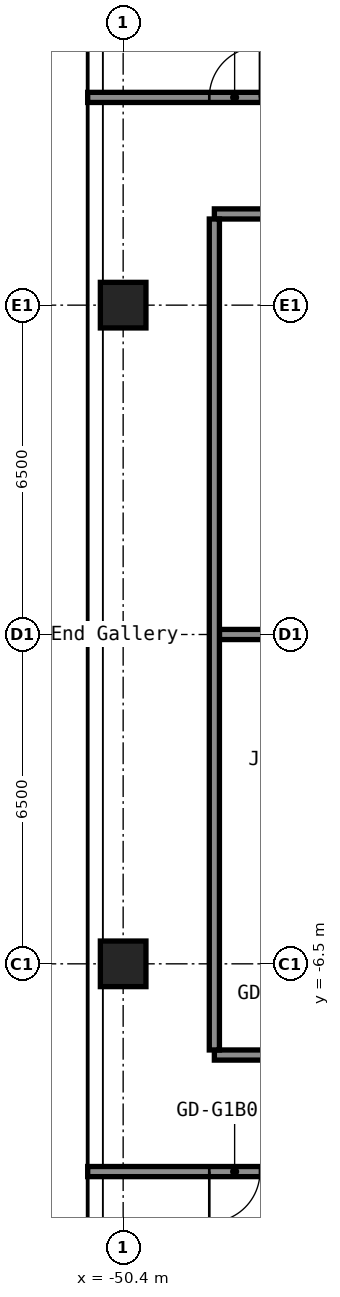
"""IFC4 building model, lengths in metres.
Left out: names, types, materials, properties, quantities, classifications, styles, units other than length and angle.
Written with IfcOpenShell. Run it as: python <this file> out.ifc"""

import sys

from ifc_helpers import new_model, si_unit, direction, frame, frame_2d, origin, origin_2d, place, context, subcontext, project, spatial, rectangle, hollow_rectangle, extrude, element, fill, save


model = new_model("IFC4")
c1 = context("Model", 3, precision=1e-05, world=origin(), true_north=direction((0.0, 1.0)))
c2 = subcontext(c1, "Body", "Model", "MODEL_VIEW")
j1 = project(units=[si_unit("LENGTHUNIT", "METRE"), si_unit("PLANEANGLEUNIT", "RADIAN")], contexts=[c1])
p1 = place(None, origin())
s1 = spatial("IfcSite", under=j1, at=p1, CompositionType="ELEMENT")
p2 = place(p1, origin())
s2 = spatial("IfcBuilding", under=s1, at=p2, CompositionType="ELEMENT")
p3 = place(p2, frame((0.0, 0.0, 23.0)))
s3 = spatial("IfcBuildingStorey", under=s2, at=p3, CompositionType="ELEMENT", Elevation=23.0)
for number, where, z_axis, x_axis in (
    (1, (-50.4, -6.5, 0.0), (0.0, 0.0, 1.0), (1.0, 0.0, 0.0)),
    (2, (-50.4, 6.5, 0.0), (0.0, 0.0, 1.0), (1.0, 0.0, 0.0)),
):
    element("IfcColumn", number, at=place(p3, frame(where, z_axis=z_axis, x_axis=x_axis)), inside=s3, PredefinedType="COLUMN", context=c2, shape_type="SweptSolid", body=[
        extrude(hollow_rectangle(XDim=0.9, YDim=0.9, WallThickness=0.036, at=origin_2d()), origin(), (0.0, 0.0, 1.0), 2.8),
    ])
p4 = place(p3, frame((-51.1, -10.6, 0.0), z_axis=(0.0, 0.0, 1.0), x_axis=(1.0, 0.0, 0.0)))
e3 = element("IfcWall", 3, at=p4, inside=s3, PredefinedType="PARTITIONING", context=c2, shape_type="SweptSolid", body=[
    extrude(rectangle(XDim=34.3, YDim=0.2, at=frame_2d((17.15, 0.0))), origin(), (0.0, 0.0, 1.0), 2.8),
])
p5 = place(p4, frame((2.4, 0.0, 0.0)))
e4 = element("IfcOpeningElement", 4, at=p5, cuts=e3, PredefinedType="OPENING", context=c2, shape_type="SweptSolid", body=[
    extrude(rectangle(XDim=1.0, YDim=2.1, at=frame_2d((0.5, 1.05))), frame((0.0, 0.11, 0.0), z_axis=(0.0, -1.0, 0.0), x_axis=(1.0, 0.0, 0.0)), (0.0, 0.0, 1.0), 0.22),
])
p6 = place(p4, frame((11.95, 0.0, 0.0)))
e5 = element("IfcOpeningElement", 5, at=p6, cuts=e3, PredefinedType="OPENING", context=c2, shape_type="SweptSolid", body=[
    extrude(rectangle(XDim=1.0, YDim=2.1, at=frame_2d((0.5, 1.05))), frame((0.0, 0.11, 0.0), z_axis=(0.0, -1.0, 0.0), x_axis=(1.0, 0.0, 0.0)), (0.0, 0.0, 1.0), 0.22),
])
p7 = place(p4, frame((13.65, 0.0, 0.0)))
e6 = element("IfcOpeningElement", 6, at=p7, cuts=e3, PredefinedType="OPENING", context=c2, shape_type="SweptSolid", body=[
    extrude(rectangle(XDim=1.0, YDim=2.1, at=frame_2d((0.5, 1.05))), frame((0.0, 0.11, 0.0), z_axis=(0.0, -1.0, 0.0), x_axis=(1.0, 0.0, 0.0)), (0.0, 0.0, 1.0), 0.22),
])
p8 = place(p4, frame((20.35, 0.0, 0.0)))
e7 = element("IfcOpeningElement", 7, at=p8, cuts=e3, PredefinedType="OPENING", context=c2, shape_type="SweptSolid", body=[
    extrude(rectangle(XDim=1.0, YDim=2.1, at=frame_2d((0.5, 1.05))), frame((0.0, 0.11, 0.0), z_axis=(0.0, -1.0, 0.0), x_axis=(1.0, 0.0, 0.0)), (0.0, 0.0, 1.0), 0.22),
])
p9 = place(p4, frame((22.05, 0.0, 0.0)))
e8 = element("IfcOpeningElement", 8, at=p9, cuts=e3, PredefinedType="OPENING", context=c2, shape_type="SweptSolid", body=[
    extrude(rectangle(XDim=1.0, YDim=2.1, at=frame_2d((0.5, 1.05))), frame((0.0, 0.11, 0.0), z_axis=(0.0, -1.0, 0.0), x_axis=(1.0, 0.0, 0.0)), (0.0, 0.0, 1.0), 0.22),
])
p10 = place(p4, frame((28.75, 0.0, 0.0)))
e9 = element("IfcOpeningElement", 9, at=p10, cuts=e3, PredefinedType="OPENING", context=c2, shape_type="SweptSolid", body=[
    extrude(rectangle(XDim=1.0, YDim=2.1, at=frame_2d((0.5, 1.05))), frame((0.0, 0.11, 0.0), z_axis=(0.0, -1.0, 0.0), x_axis=(1.0, 0.0, 0.0)), (0.0, 0.0, 1.0), 0.22),
])
p11 = place(p4, frame((30.45, 0.0, 0.0)))
e10 = element("IfcOpeningElement", 10, at=p11, cuts=e3, PredefinedType="OPENING", context=c2, shape_type="SweptSolid", body=[
    extrude(rectangle(XDim=1.0, YDim=2.1, at=frame_2d((0.5, 1.05))), frame((0.0, 0.11, 0.0), z_axis=(0.0, -1.0, 0.0), x_axis=(1.0, 0.0, 0.0)), (0.0, 0.0, 1.0), 0.22),
])
p12 = place(p3, frame((-48.6, -8.3, 0.0), z_axis=(0.0, 0.0, 1.0), x_axis=(1.0, 0.0, 0.0)))
e11 = element("IfcWall", 11, at=p12, inside=s3, PredefinedType="PARTITIONING", context=c2, shape_type="SweptSolid", body=[
    extrude(rectangle(XDim=15.0, YDim=0.2, at=frame_2d((7.5, 0.0))), origin(), (0.0, 0.0, 1.0), 2.8),
])
p13 = place(p12, frame((1.1, 0.0, 0.0)))
e12 = element("IfcOpeningElement", 12, at=p13, cuts=e11, PredefinedType="OPENING", context=c2, shape_type="SweptSolid", body=[
    extrude(rectangle(XDim=1.0, YDim=2.1, at=frame_2d((0.5, 1.05))), frame((0.0, 0.11, 0.0), z_axis=(0.0, -1.0, 0.0), x_axis=(1.0, 0.0, 0.0)), (0.0, 0.0, 1.0), 0.22),
])
p14 = place(p12, frame((12.0, 0.0, 0.0)))
e13 = element("IfcOpeningElement", 13, at=p14, cuts=e11, PredefinedType="OPENING", context=c2, shape_type="SweptSolid", body=[
    extrude(rectangle(XDim=1.0, YDim=2.1, at=frame_2d((0.5, 1.05))), frame((0.0, 0.11, 0.0), z_axis=(0.0, -1.0, 0.0), x_axis=(1.0, 0.0, 0.0)), (0.0, 0.0, 1.0), 0.22),
])
p15 = place(p3, frame((-48.5, 0.0, 0.0), z_axis=(0.0, 0.0, 1.0), x_axis=(1.0, 0.0, 0.0)))
e14 = element("IfcWall", 14, at=p15, inside=s3, PredefinedType="PARTITIONING", context=c2, shape_type="SweptSolid", body=[
    extrude(rectangle(XDim=14.9, YDim=0.2, at=frame_2d((7.45, 0.0))), origin(), (0.0, 0.0, 1.0), 2.8),
])
p16 = place(p3, frame((-48.6, 8.3, 0.0), z_axis=(0.0, 0.0, 1.0), x_axis=(1.0, 0.0, 0.0)))
e15 = element("IfcWall", 15, at=p16, inside=s3, PredefinedType="PARTITIONING", context=c2, shape_type="SweptSolid", body=[
    extrude(rectangle(XDim=15.0, YDim=0.2, at=frame_2d((7.5, 0.0))), origin(), (0.0, 0.0, 1.0), 2.8),
])
p17 = place(p16, frame((3.85, 0.0, 0.0)))
e16 = element("IfcOpeningElement", 16, at=p17, cuts=e15, PredefinedType="OPENING", context=c2, shape_type="SweptSolid", body=[
    extrude(rectangle(XDim=1.6, YDim=2.1, at=frame_2d((0.8, 1.05))), frame((0.0, 0.11, 0.0), z_axis=(0.0, -1.0, 0.0), x_axis=(1.0, 0.0, 0.0)), (0.0, 0.0, 1.0), 0.22),
])
p18 = place(p3, frame((-51.1, 10.6, 0.0), z_axis=(0.0, 0.0, 1.0), x_axis=(1.0, 0.0, 0.0)))
e17 = element("IfcWall", 17, at=p18, inside=s3, PredefinedType="PARTITIONING", context=c2, shape_type="SweptSolid", body=[
    extrude(rectangle(XDim=34.3, YDim=0.2, at=frame_2d((17.15, 0.0))), origin(), (0.0, 0.0, 1.0), 2.8),
])
p19 = place(p18, frame((2.4, 0.0, 0.0)))
e18 = element("IfcOpeningElement", 18, at=p19, cuts=e17, PredefinedType="OPENING", context=c2, shape_type="SweptSolid", body=[
    extrude(rectangle(XDim=1.0, YDim=2.1, at=frame_2d((0.5, 1.05))), frame((0.0, 0.11, 0.0), z_axis=(0.0, -1.0, 0.0), x_axis=(1.0, 0.0, 0.0)), (0.0, 0.0, 1.0), 0.22),
])
p20 = place(p18, frame((11.95, 0.0, 0.0)))
e19 = element("IfcOpeningElement", 19, at=p20, cuts=e17, PredefinedType="OPENING", context=c2, shape_type="SweptSolid", body=[
    extrude(rectangle(XDim=1.0, YDim=2.1, at=frame_2d((0.5, 1.05))), frame((0.0, 0.11, 0.0), z_axis=(0.0, -1.0, 0.0), x_axis=(1.0, 0.0, 0.0)), (0.0, 0.0, 1.0), 0.22),
])
p21 = place(p18, frame((13.65, 0.0, 0.0)))
e20 = element("IfcOpeningElement", 20, at=p21, cuts=e17, PredefinedType="OPENING", context=c2, shape_type="SweptSolid", body=[
    extrude(rectangle(XDim=1.0, YDim=2.1, at=frame_2d((0.5, 1.05))), frame((0.0, 0.11, 0.0), z_axis=(0.0, -1.0, 0.0), x_axis=(1.0, 0.0, 0.0)), (0.0, 0.0, 1.0), 0.22),
])
p22 = place(p18, frame((20.35, 0.0, 0.0)))
e21 = element("IfcOpeningElement", 21, at=p22, cuts=e17, PredefinedType="OPENING", context=c2, shape_type="SweptSolid", body=[
    extrude(rectangle(XDim=1.0, YDim=2.1, at=frame_2d((0.5, 1.05))), frame((0.0, 0.11, 0.0), z_axis=(0.0, -1.0, 0.0), x_axis=(1.0, 0.0, 0.0)), (0.0, 0.0, 1.0), 0.22),
])
p23 = place(p18, frame((22.05, 0.0, 0.0)))
e22 = element("IfcOpeningElement", 22, at=p23, cuts=e17, PredefinedType="OPENING", context=c2, shape_type="SweptSolid", body=[
    extrude(rectangle(XDim=1.0, YDim=2.1, at=frame_2d((0.5, 1.05))), frame((0.0, 0.11, 0.0), z_axis=(0.0, -1.0, 0.0), x_axis=(1.0, 0.0, 0.0)), (0.0, 0.0, 1.0), 0.22),
])
p24 = place(p18, frame((28.75, 0.0, 0.0)))
e23 = element("IfcOpeningElement", 23, at=p24, cuts=e17, PredefinedType="OPENING", context=c2, shape_type="SweptSolid", body=[
    extrude(rectangle(XDim=1.0, YDim=2.1, at=frame_2d((0.5, 1.05))), frame((0.0, 0.11, 0.0), z_axis=(0.0, -1.0, 0.0), x_axis=(1.0, 0.0, 0.0)), (0.0, 0.0, 1.0), 0.22),
])
p25 = place(p18, frame((30.45, 0.0, 0.0)))
e24 = element("IfcOpeningElement", 24, at=p25, cuts=e17, PredefinedType="OPENING", context=c2, shape_type="SweptSolid", body=[
    extrude(rectangle(XDim=1.0, YDim=2.1, at=frame_2d((0.5, 1.05))), frame((0.0, 0.11, 0.0), z_axis=(0.0, -1.0, 0.0), x_axis=(1.0, 0.0, 0.0)), (0.0, 0.0, 1.0), 0.22),
])
p26 = place(p3, frame((-48.6, -8.2, 0.0), z_axis=(0.0, 0.0, 1.0), x_axis=(0.0, 1.0, 0.0)))
e25 = element("IfcWall", 25, at=p26, inside=s3, PredefinedType="PARTITIONING", context=c2, shape_type="SweptSolid", body=[
    extrude(rectangle(XDim=16.4, YDim=0.2, at=frame_2d((8.2, 0.0))), origin(), (0.0, 0.0, 1.0), 2.8),
])
p27 = place(p5, origin())
e26 = element("IfcDoor", 26, at=p27, inside=s3, OperationType="SINGLE_SWING_LEFT", PredefinedType="DOOR", context=c2, shape_type="SweptSolid", body=[
    extrude(rectangle(XDim=1.0, YDim=2.1, at=frame_2d((0.5, 1.05))), frame((0.0, 0.025, 0.0), z_axis=(0.0, -1.0, 0.0), x_axis=(1.0, 0.0, 0.0)), (0.0, 0.0, 1.0), 0.05),
])
fill(e4, e26)
p28 = place(p19, origin())
e27 = element("IfcDoor", 27, at=p28, inside=s3, OperationType="SINGLE_SWING_LEFT", PredefinedType="DOOR", context=c2, shape_type="SweptSolid", body=[
    extrude(rectangle(XDim=1.0, YDim=2.1, at=frame_2d((0.5, 1.05))), frame((0.0, 0.025, 0.0), z_axis=(0.0, -1.0, 0.0), x_axis=(1.0, 0.0, 0.0)), (0.0, 0.0, 1.0), 0.05),
])
fill(e18, e27)
save(model, sys.argv[1])
